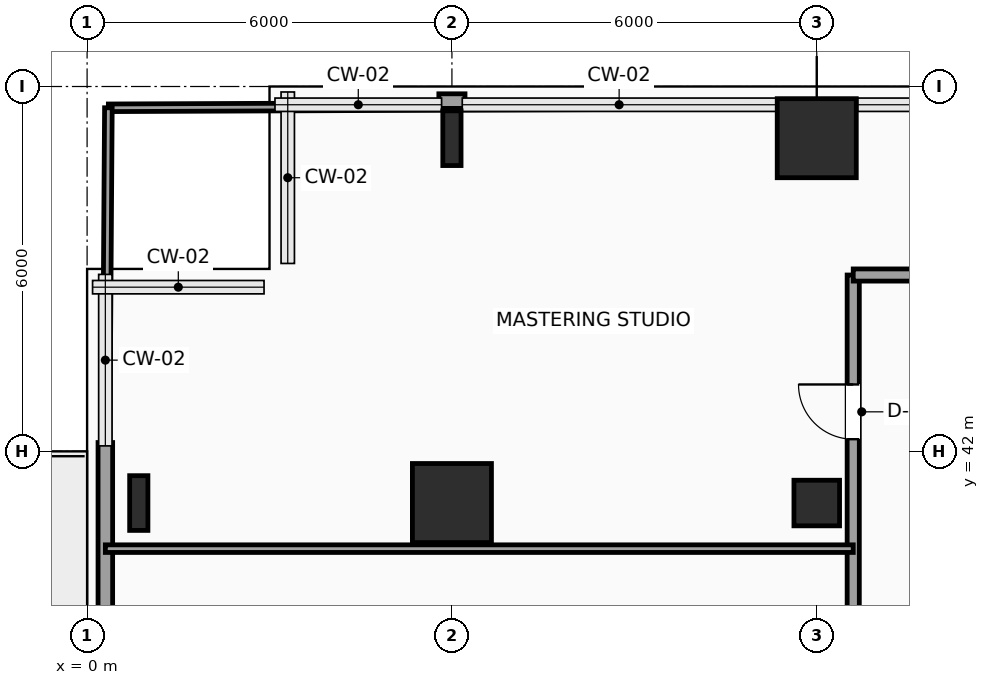
"""IFC4 building model, lengths in metres.
Left out: names, types, materials, properties, quantities, classifications, styles, units other than length and angle.
Written with IfcOpenShell. Run it as: python <this file> out.ifc"""

import sys

from ifc_helpers import new_model, si_unit, direction, frame, frame_2d, origin, origin_2d, place, context, subcontext, project, spatial, rectangle, hollow_rectangle, i_section, extrude, element, fill, save


model = new_model("IFC4")
c1 = context("Model", 3, precision=1e-05, world=origin(), true_north=direction((0.0, 1.0)))
c2 = subcontext(c1, "Body", "Model", "MODEL_VIEW")
j1 = project(units=[si_unit("LENGTHUNIT", "METRE"), si_unit("PLANEANGLEUNIT", "RADIAN")], contexts=[c1])
p1 = place(None, origin())
s1 = spatial("IfcSite", under=j1, at=p1, CompositionType="ELEMENT")
p2 = place(p1, origin())
s2 = spatial("IfcBuilding", under=s1, at=p2, CompositionType="ELEMENT")
p3 = place(p2, frame((0.0, 0.0, 44.1)))
s3 = spatial("IfcBuildingStorey", under=s2, at=p3, CompositionType="ELEMENT", Elevation=44.1)
p4 = place(p3, frame((0.85, 41.15, 0.0), z_axis=(0.0, 0.0, 1.0), x_axis=(1.0, 0.0, 0.0)))
e1 = element("IfcColumn", 1, at=p4, inside=s3, PredefinedType="COLUMN", context=c2, shape_type="SweptSolid", body=[
    extrude(i_section(OverallWidth=0.3, OverallDepth=0.9, WebThickness=0.019, FlangeThickness=0.035, FilletRadius=0.03, at=origin_2d()), origin(), (0.0, 0.0, 1.0), 3.9),
])
p5 = place(p3, frame((6.0, 41.15, 0.0), z_axis=(0.0, 0.0, 1.0), x_axis=(1.0, 0.0, 0.0)))
e2 = element("IfcColumn", 2, at=p5, inside=s3, PredefinedType="COLUMN", context=c2, shape_type="SweptSolid", body=[
    extrude(rectangle(XDim=1.3, YDim=1.3, at=origin_2d()), origin(), (0.0, 0.0, 1.0), 3.9),
])
p6 = place(p3, frame((6.0, 47.15, 0.0), z_axis=(0.0, 0.0, 1.0), x_axis=(1.0, 0.0, 0.0)))
e3 = element("IfcColumn", 3, at=p6, inside=s3, PredefinedType="COLUMN", context=c2, shape_type="SweptSolid", body=[
    extrude(i_section(OverallWidth=0.3, OverallDepth=0.9, WebThickness=0.019, FlangeThickness=0.035, FilletRadius=0.03, at=origin_2d()), origin(), (0.0, 0.0, 1.0), 3.9),
])
p7 = place(p3, frame((12.0, 41.15, 0.0), z_axis=(0.0, 0.0, 1.0), x_axis=(1.0, 0.0, 0.0)))
e4 = element("IfcColumn", 4, at=p7, inside=s3, PredefinedType="COLUMN", context=c2, shape_type="SweptSolid", body=[
    extrude(hollow_rectangle(XDim=0.75, YDim=0.75, WallThickness=0.035, InnerFilletRadius=0.035, OuterFilletRadius=0.05, at=origin_2d()), origin(), (0.0, 0.0, 1.0), 3.9),
])
p8 = place(p3, frame((12.0, 47.15, 0.0), z_axis=(0.0, 0.0, 1.0), x_axis=(1.0, 0.0, 0.0)))
e5 = element("IfcColumn", 5, at=p8, inside=s3, PredefinedType="COLUMN", context=c2, shape_type="SweptSolid", body=[
    extrude(rectangle(XDim=1.3, YDim=1.3, at=origin_2d()), origin(), (0.0, 0.0, 1.0), 3.9),
])
p9 = place(p3, frame((0.3, 32.855, 0.0), z_axis=(0.0, 0.0, 1.0), x_axis=(0.0, 1.0, 0.0)))
e6 = element("IfcWall", 6, at=p9, inside=s3, PredefinedType="SOLIDWALL", context=c2, shape_type="SweptSolid", body=[
    extrude(rectangle(XDim=9.29, YDim=0.24, at=frame_2d((4.645, 0.0))), origin(), (0.0, 0.0, 1.0), 3.65),
])
p10 = place(p9, frame((3.945, 0.0, 0.0)))
e7 = element("IfcOpeningElement", 7, at=p10, cuts=e6, PredefinedType="OPENING", context=c2, shape_type="SweptSolid", body=[
    extrude(rectangle(XDim=1.05, YDim=2.2, at=frame_2d((0.525, 1.1))), frame((0.0, 0.13, 0.0), z_axis=(0.0, -1.0, 0.0), x_axis=(1.0, 0.0, 0.0)), (0.0, 0.0, 1.0), 0.26),
])
p11 = place(p3, frame((5.785, 47.76, 0.0), z_axis=(0.0, 0.0, 1.0), x_axis=(1.0, 0.0, 0.0)))
e8 = element("IfcWall", 8, at=p11, inside=s3, PredefinedType="SOLIDWALL", context=c2, shape_type="SweptSolid", body=[
    extrude(rectangle(XDim=0.43, YDim=0.24, at=frame_2d((0.215, 0.0))), origin(), (0.0, 0.0, 1.0), 3.65),
])
p12 = place(p3, frame((12.6, 32.65, 0.0), z_axis=(0.0, 0.0, 1.0), x_axis=(0.0, 1.0, 0.0)))
e9 = element("IfcWall", 9, at=p12, inside=s3, PredefinedType="PARTITIONING", context=c2, shape_type="SweptSolid", body=[
    extrude(rectangle(XDim=12.25, YDim=0.2, at=frame_2d((6.125, 0.0))), origin(), (0.0, 0.0, 1.0), 3.65),
])
p13 = place(p12, frame((0.98, 0.0, 0.0)))
e10 = element("IfcOpeningElement", 10, at=p13, cuts=e9, PredefinedType="OPENING", context=c2, shape_type="SweptSolid", body=[
    extrude(rectangle(XDim=0.9, YDim=2.1, at=frame_2d((0.45, 1.05))), frame((0.0, 0.11, 0.0), z_axis=(0.0, -1.0, 0.0), x_axis=(1.0, 0.0, 0.0)), (0.0, 0.0, 1.0), 0.22),
])
p14 = place(p12, frame((5.2, 0.0, 0.0)))
e11 = element("IfcOpeningElement", 11, at=p14, cuts=e9, PredefinedType="OPENING", context=c2, shape_type="SweptSolid", body=[
    extrude(rectangle(XDim=0.9, YDim=2.1, at=frame_2d((0.45, 1.05))), frame((0.0, 0.11, 0.0), z_axis=(0.0, -1.0, 0.0), x_axis=(1.0, 0.0, 0.0)), (0.0, 0.0, 1.0), 0.22),
])
p15 = place(p12, frame((9.55, 0.0, 0.0)))
e12 = element("IfcOpeningElement", 12, at=p15, cuts=e9, PredefinedType="OPENING", context=c2, shape_type="SweptSolid", body=[
    extrude(rectangle(XDim=0.9, YDim=2.1, at=frame_2d((0.45, 1.05))), frame((0.0, 0.11, 0.0), z_axis=(0.0, -1.0, 0.0), x_axis=(1.0, 0.0, 0.0)), (0.0, 0.0, 1.0), 0.22),
])
p16 = place(p3, frame((12.6, 44.9, 0.0), z_axis=(0.0, 0.0, 1.0), x_axis=(1.0, 0.0, 0.0)))
e13 = element("IfcWall", 13, at=p16, inside=s3, PredefinedType="PARTITIONING", context=c2, shape_type="SweptSolid", body=[
    extrude(rectangle(XDim=2.35, YDim=0.2, at=frame_2d((1.175, 0.0))), origin(), (0.0, 0.0, 1.0), 3.65),
])
p17 = place(p3, frame((0.3, 40.4, 0.0), z_axis=(0.0, 0.0, 1.0), x_axis=(1.0, 0.0, 0.0)))
e14 = element("IfcWall", 14, at=p17, inside=s3, PredefinedType="PARTITIONING", context=c2, shape_type="SweptSolid", body=[
    extrude(rectangle(XDim=12.3, YDim=0.125, at=frame_2d((6.15, 0.0))), origin(), (0.0, 0.0, 1.0), 3.65),
])
p18 = place(p3, frame((0.35, 47.65, 0.0), z_axis=(0.0, 0.0, 1.0), x_axis=(0.999991644778, 0.004087832518, 0.0)))
e15 = element("IfcWall", 15, at=p18, inside=s3, PredefinedType="PARTITIONING", context=c2, shape_type="SweptSolid", body=[
    extrude(rectangle(XDim=5.435, YDim=0.125, at=frame_2d((2.717, 0.0))), origin(), (0.0, 0.0, 1.0), 3.65),
])
p19 = place(p3, frame((6.215, 47.674, 0.0), z_axis=(0.0, 0.0, 1.0), x_axis=(0.999991630701, 0.004091274595, 0.0)))
e16 = element("IfcWall", 16, at=p19, inside=s3, PredefinedType="PARTITIONING", context=c2, shape_type="SweptSolid", body=[
    extrude(rectangle(XDim=6.385, YDim=0.125, at=frame_2d((3.192, 0.0))), origin(), (0.0, 0.0, 1.0), 3.65),
])
p20 = place(p3, frame((0.312, 42.145, 0.0), z_axis=(0.0, 0.0, 1.0), x_axis=(0.006918408131, 0.999976067528, 0.0)))
e17 = element("IfcWall", 17, at=p20, inside=s3, PredefinedType="PARTITIONING", context=c2, shape_type="SweptSolid", body=[
    extrude(rectangle(XDim=5.505, YDim=0.125, at=frame_2d((2.752, 0.0))), origin(), (0.0, 0.0, 1.0), 3.65),
])
p21 = place(p15, origin())
e18 = element("IfcDoor", 18, at=p21, inside=s3, OperationType="SINGLE_SWING_RIGHT", PredefinedType="DOOR", context=c2, shape_type="SweptSolid", body=[
    extrude(rectangle(XDim=0.9, YDim=2.1, at=frame_2d((0.45, 1.05))), frame((0.0, 0.025, 0.0), z_axis=(0.0, -1.0, 0.0), x_axis=(1.0, 0.0, 0.0)), (0.0, 0.0, 1.0), 0.05),
])
fill(e12, e18)
save(model, sys.argv[1])
